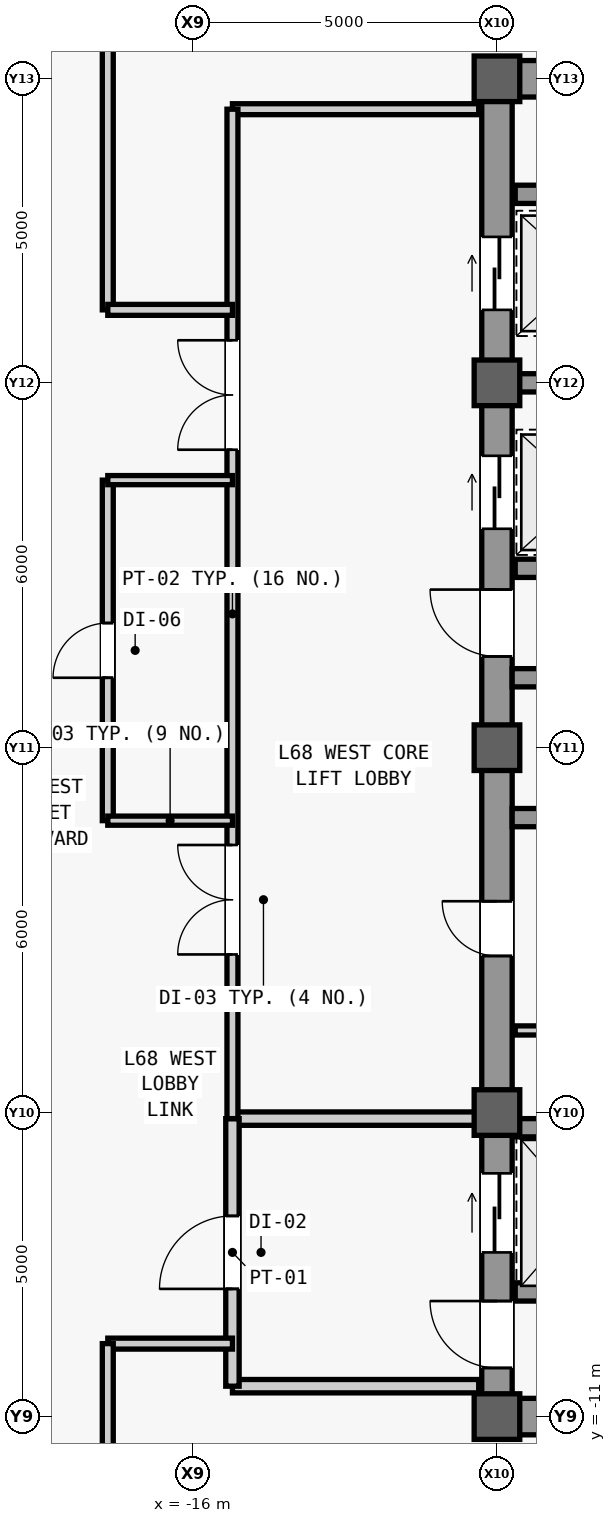
"""IFC4 building model, lengths in metres.
Left out: names, types, materials, properties, quantities, classifications, styles, units other than length and angle.
Written with IfcOpenShell. Run it as: python <this file> out.ifc"""

import sys

from ifc_helpers import new_model, si_unit, direction, frame, frame_2d, origin, origin_2d, place, context, subcontext, project, spatial, rectangle, extrude, source, transform, mapped, element, fill, save


model = new_model("IFC4")
c1 = context("Model", 3, precision=1e-05, world=origin(), true_north=direction((0.0, 1.0)))
c2 = subcontext(c1, "Body", "Model", "MODEL_VIEW")
j1 = project(units=[si_unit("LENGTHUNIT", "METRE"), si_unit("PLANEANGLEUNIT", "RADIAN")], contexts=[c1])
p1 = place(None, origin())
s1 = spatial("IfcSite", under=j1, at=p1, CompositionType="ELEMENT")
p2 = place(p1, origin())
s2 = spatial("IfcBuilding", under=s1, at=p2, CompositionType="ELEMENT")
p3 = place(p2, frame((0.0, 0.0, 289.5)))
s3 = spatial("IfcBuildingStorey", under=s2, at=p3, CompositionType="ELEMENT", Elevation=289.5)
m1 = source(origin(), c2, "Body", "SweptSolid", [
    extrude(rectangle(XDim=22.0, YDim=0.5, at=frame_2d((11.0, 0.0))), origin(), (0.0, 0.0, 1.0), 3.78),
])
p4 = place(p3, frame((-11.0, -11.0, 0.0), z_axis=(0.0, 0.0, 1.0), x_axis=(0.0, 1.0, 0.0)))
e1 = element("IfcWall", 1, at=p4, inside=s3, PredefinedType="SHEAR", context=c2, shape_type="MappedRepresentation", body=[
    mapped(m1, transform((0.0, 0.0, 0.0), scale=1.0)),
])
m2 = source(origin(), c2, "Body", "SweptSolid", [
    extrude(rectangle(XDim=1.1, YDim=2.2, at=frame_2d((0.55, 1.1))), frame((0.0, 0.26, 0.0), z_axis=(0.0, -1.0, 0.0), x_axis=(1.0, 0.0, 0.0)), (0.0, 0.0, 1.0), 0.52),
])
p5 = place(p4, frame((0.8, 0.0, 0.0)))
e2 = element("IfcOpeningElement", 2, at=p5, cuts=e1, PredefinedType="OPENING", context=c2, shape_type="MappedRepresentation", body=[
    mapped(m2, transform((0.0, 0.0, 0.0), scale=1.0)),
])
p6 = place(p4, frame((12.5, 0.0, 0.0)))
e3 = element("IfcOpeningElement", 3, at=p6, cuts=e1, PredefinedType="OPENING", context=c2, shape_type="MappedRepresentation", body=[
    mapped(m2, transform((0.0, 0.0, 0.0), scale=1.0)),
])
m3 = source(origin(), c2, "Body", "SweptSolid", [
    extrude(rectangle(XDim=0.9, YDim=2.15, at=frame_2d((0.45, 1.075))), frame((0.0, 0.26, 0.0), z_axis=(0.0, -1.0, 0.0), x_axis=(1.0, 0.0, 0.0)), (0.0, 0.0, 1.0), 0.52),
])
p7 = place(p4, frame((7.575, 0.0, 0.0)))
e4 = element("IfcOpeningElement", 4, at=p7, cuts=e1, PredefinedType="OPENING", context=c2, shape_type="MappedRepresentation", body=[
    mapped(m3, transform((0.0, 0.0, 0.0), scale=1.0)),
])
m4 = source(origin(), c2, "Body", "SweptSolid", [
    extrude(rectangle(XDim=1.2, YDim=2.3, at=frame_2d((0.6, 1.15))), frame((0.0, 0.26, 0.0), z_axis=(0.0, -1.0, 0.0), x_axis=(1.0, 0.0, 0.0)), (0.0, 0.0, 1.0), 0.52),
])
p8 = place(p4, frame((14.6, 0.0, 0.0)))
e5 = element("IfcOpeningElement", 5, at=p8, cuts=e1, PredefinedType="OPENING", context=c2, shape_type="MappedRepresentation", body=[
    mapped(m4, transform((0.0, 0.0, 0.0), scale=1.0)),
])
p9 = place(p4, frame((18.2, 0.0, 0.0)))
e6 = element("IfcOpeningElement", 6, at=p9, cuts=e1, PredefinedType="OPENING", context=c2, shape_type="MappedRepresentation", body=[
    mapped(m4, transform((0.0, 0.0, 0.0), scale=1.0)),
])
m5 = source(origin(), c2, "Body", "SweptSolid", [
    extrude(rectangle(XDim=1.3, YDim=2.3, at=frame_2d((0.65, 1.15))), frame((0.0, 0.26, 0.0), z_axis=(0.0, -1.0, 0.0), x_axis=(1.0, 0.0, 0.0)), (0.0, 0.0, 1.0), 0.52),
])
p10 = place(p4, frame((2.7, 0.0, 0.0)))
e7 = element("IfcOpeningElement", 7, at=p10, cuts=e1, PredefinedType="OPENING", context=c2, shape_type="MappedRepresentation", body=[
    mapped(m5, transform((0.0, 0.0, 0.0), scale=1.0)),
])
m6 = source(origin(), c2, "Body", "SweptSolid", [
    extrude(rectangle(XDim=5.9, YDim=0.6, at=frame_2d((2.95, 0.0))), origin(), (0.0, 0.0, 1.0), 3.78),
])
for number, where, z_axis, x_axis in (
    (8, (-10.75, -11.0, 0.0), (0.0, 0.0, 1.0), (1.0, 0.0, 0.0)),
    (9, (-10.75, 11.0, 0.0), (0.0, 0.0, 1.0), (1.0, 0.0, 0.0)),
):
    element("IfcWall", number, at=place(p3, frame(where, z_axis=z_axis, x_axis=x_axis)), inside=s3, PredefinedType="SHEAR", context=c2, shape_type="MappedRepresentation", body=[
        mapped(m6, transform((0.0, 0.0, 0.0), scale=1.0)),
    ])
m7 = source(origin(), c2, "Body", "SweptSolid", [
    extrude(rectangle(XDim=5.65, YDim=0.3, at=frame_2d((2.825, 0.0))), origin(), (0.0, 0.0, 1.0), 3.78),
])
for number, where, z_axis, x_axis in (
    (10, (-10.75, -1.15, 0.0), (0.0, 0.0, 1.0), (1.0, 0.0, 0.0)),
    (11, (-10.75, 1.15, 0.0), (0.0, 0.0, 1.0), (1.0, 0.0, 0.0)),
):
    element("IfcWall", number, at=place(p3, frame(where, z_axis=z_axis, x_axis=x_axis)), inside=s3, PredefinedType="SHEAR", context=c2, shape_type="MappedRepresentation", body=[
        mapped(m7, transform((0.0, 0.0, 0.0), scale=1.0)),
    ])
m8 = source(origin(), c2, "Body", "SweptSolid", [
    extrude(rectangle(XDim=0.75, YDim=0.75, at=origin_2d()), origin(), (0.0, 0.0, 1.0), 4.0),
])
for number, where, z_axis, x_axis in (
    (12, (-11.0, -11.0, 0.0), (0.0, 0.0, 1.0), (1.0, 0.0, 0.0)),
    (13, (-11.0, -6.0, 0.0), (0.0, 0.0, 1.0), (1.0, 0.0, 0.0)),
    (14, (-11.0, 0.0, 0.0), (0.0, 0.0, 1.0), (1.0, 0.0, 0.0)),
    (15, (-11.0, 6.0, 0.0), (0.0, 0.0, 1.0), (1.0, 0.0, 0.0)),
    (16, (-11.0, 11.0, 0.0), (0.0, 0.0, 1.0), (1.0, 0.0, 0.0)),
):
    element("IfcColumn", number, at=place(p3, frame(where, z_axis=z_axis, x_axis=x_axis)), inside=s3, PredefinedType="COLUMN", context=c2, shape_type="MappedRepresentation", body=[
        mapped(m8, transform((0.0, 0.0, 0.0), scale=1.0)),
    ])
m9 = source(origin(), c2, "Body", "SweptSolid", [
    extrude(rectangle(XDim=2.2, YDim=0.3, at=frame_2d((1.1, 0.0))), origin(), (0.0, 0.0, 1.0), 3.78),
])
for number, where, z_axis, x_axis in (
    (17, (-10.7, -8.95, 0.0), (0.0, 0.0, 1.0), (1.0, 0.0, 0.0)),
    (18, (-10.7, -6.25, 0.0), (0.0, 0.0, 1.0), (1.0, 0.0, 0.0)),
    (19, (-10.7, 2.95, 0.0), (0.0, 0.0, 1.0), (1.0, 0.0, 0.0)),
    (20, (-10.7, 6.0, 0.0), (0.0, 0.0, 1.0), (1.0, 0.0, 0.0)),
    (21, (-10.7, 9.1, 0.0), (0.0, 0.0, 1.0), (1.0, 0.0, 0.0)),
):
    element("IfcWall", number, at=place(p3, frame(where, z_axis=z_axis, x_axis=x_axis)), inside=s3, PredefinedType="SHEAR", context=c2, shape_type="MappedRepresentation", body=[
        mapped(m9, transform((0.0, 0.0, 0.0), scale=1.0)),
    ])
m10 = source(origin(), c2, "Body", "SweptSolid", [
    extrude(rectangle(XDim=2.05, YDim=0.15, at=frame_2d((1.025, 0.0))), origin(), (0.0, 0.0, 1.0), 3.78),
])
p11 = place(p3, frame((-10.7, -4.65, 0.0), z_axis=(0.0, 0.0, 1.0), x_axis=(1.0, 0.0, 0.0)))
e22 = element("IfcWall", 22, at=p11, inside=s3, PredefinedType="PARTITIONING", context=c2, shape_type="MappedRepresentation", body=[
    mapped(m10, transform((0.0, 0.0, 0.0), scale=1.0)),
])
m11 = source(origin(), c2, "Body", "SweptSolid", [
    extrude(rectangle(XDim=4.05, YDim=0.22, at=frame_2d((2.025, 0.0))), origin(), (0.0, 0.0, 1.0), 3.78),
])
p12 = place(p3, frame((-15.35, -10.5, 0.0), z_axis=(0.0, 0.0, 1.0), x_axis=(1.0, 0.0, 0.0)))
e23 = element("IfcWall", 23, at=p12, inside=s3, PredefinedType="PARTITIONING", context=c2, shape_type="MappedRepresentation", body=[
    mapped(m11, transform((0.0, 0.0, 0.0), scale=1.0)),
])
m12 = source(origin(), c2, "Body", "SweptSolid", [
    extrude(rectangle(XDim=4.05, YDim=0.22, at=frame_2d((2.025, 0.0))), origin(), (0.0, 0.0, 1.0), 3.085),
])
p13 = place(p3, frame((-15.35, -6.1, 0.0), z_axis=(0.0, 0.0, 1.0), x_axis=(1.0, 0.0, 0.0)))
e24 = element("IfcWall", 24, at=p13, inside=s3, PredefinedType="PARTITIONING", context=c2, shape_type="MappedRepresentation", body=[
    mapped(m12, transform((0.0, 0.0, 0.0), scale=1.0)),
])
m13 = source(origin(), c2, "Body", "SweptSolid", [
    extrude(rectangle(XDim=4.4, YDim=0.22, at=frame_2d((2.2, 0.0))), origin(), (0.0, 0.0, 1.0), 3.78),
])
p14 = place(p3, frame((-15.35, -10.5, 0.0), z_axis=(0.0, 0.0, 1.0), x_axis=(0.0, 1.0, 0.0)))
e25 = element("IfcWall", 25, at=p14, inside=s3, PredefinedType="PARTITIONING", context=c2, shape_type="MappedRepresentation", body=[
    mapped(m13, transform((0.0, 0.0, 0.0), scale=1.0)),
])
m14 = source(origin(), c2, "Body", "SweptSolid", [
    extrude(rectangle(XDim=1.2, YDim=2.2, at=frame_2d((0.6, 1.1))), frame((0.0, 0.12, 0.0), z_axis=(0.0, -1.0, 0.0), x_axis=(1.0, 0.0, 0.0)), (0.0, 0.0, 1.0), 0.24),
])
p15 = place(p14, frame((1.6, 0.0, 0.0)))
e26 = element("IfcOpeningElement", 26, at=p15, cuts=e25, PredefinedType="OPENING", context=c2, shape_type="MappedRepresentation", body=[
    mapped(m14, transform((0.0, 0.0, 0.0), scale=1.0)),
])
m15 = source(origin(), c2, "Body", "SweptSolid", [
    extrude(rectangle(XDim=4.05, YDim=0.18, at=frame_2d((2.025, 0.0))), origin(), (0.0, 0.0, 1.0), 3.78),
])
p16 = place(p3, frame((-15.35, 10.5, 0.0), z_axis=(0.0, 0.0, 1.0), x_axis=(1.0, 0.0, 0.0)))
e27 = element("IfcWall", 27, at=p16, inside=s3, PredefinedType="PARTITIONING", context=c2, shape_type="MappedRepresentation", body=[
    mapped(m15, transform((0.0, 0.0, 0.0), scale=1.0)),
])
m16 = source(origin(), c2, "Body", "SweptSolid", [
    extrude(rectangle(XDim=16.6, YDim=0.18, at=frame_2d((8.3, 0.0))), origin(), (0.0, 0.0, 1.0), 3.78),
])
p17 = place(p3, frame((-15.35, -6.1, 0.0), z_axis=(0.0, 0.0, 1.0), x_axis=(0.0, 1.0, 0.0)))
e28 = element("IfcWall", 28, at=p17, inside=s3, PredefinedType="PARTITIONING", context=c2, shape_type="MappedRepresentation", body=[
    mapped(m16, transform((0.0, 0.0, 0.0), scale=1.0)),
])
m17 = source(origin(), c2, "Body", "SweptSolid", [
    extrude(rectangle(XDim=1.8, YDim=2.25, at=frame_2d((0.9, 1.125))), frame((0.0, 0.1, 0.0), z_axis=(0.0, -1.0, 0.0), x_axis=(1.0, 0.0, 0.0)), (0.0, 0.0, 1.0), 0.2),
])
p18 = place(p17, frame((2.7, 0.0, 0.0)))
e29 = element("IfcOpeningElement", 29, at=p18, cuts=e28, PredefinedType="OPENING", context=c2, shape_type="MappedRepresentation", body=[
    mapped(m17, transform((0.0, 0.0, 0.0), scale=1.0)),
])
p19 = place(p17, frame((11.0, 0.0, 0.0)))
e30 = element("IfcOpeningElement", 30, at=p19, cuts=e28, PredefinedType="OPENING", context=c2, shape_type="MappedRepresentation", body=[
    mapped(m17, transform((0.0, 0.0, 0.0), scale=1.0)),
])
m18 = source(origin(), c2, "Body", "SweptSolid", [
    extrude(rectangle(XDim=5.6, YDim=0.18, at=frame_2d((2.8, 0.0))), origin(), (0.0, 0.0, 1.0), 3.78),
])
p20 = place(p3, frame((-17.4, -1.2, 0.0), z_axis=(0.0, 0.0, 1.0), x_axis=(0.0, 1.0, 0.0)))
e31 = element("IfcWall", 31, at=p20, inside=s3, PredefinedType="PARTITIONING", context=c2, shape_type="MappedRepresentation", body=[
    mapped(m18, transform((0.0, 0.0, 0.0), scale=1.0)),
])
m19 = source(origin(), c2, "Body", "SweptSolid", [
    extrude(rectangle(XDim=0.9, YDim=2.15, at=frame_2d((0.45, 1.075))), frame((0.0, 0.1, 0.0), z_axis=(0.0, -1.0, 0.0), x_axis=(1.0, 0.0, 0.0)), (0.0, 0.0, 1.0), 0.2),
])
p21 = place(p20, frame((2.35, 0.0, 0.0)))
e32 = element("IfcOpeningElement", 32, at=p21, cuts=e31, PredefinedType="OPENING", context=c2, shape_type="MappedRepresentation", body=[
    mapped(m19, transform((0.0, 0.0, 0.0), scale=1.0)),
])
m20 = source(origin(), c2, "Body", "SweptSolid", [
    extrude(rectangle(XDim=2.05, YDim=0.15, at=frame_2d((1.025, 0.0))), origin(), (0.0, 0.0, 1.0), 3.78),
])
for number, where, z_axis, x_axis in (
    (33, (-17.4, -1.2, 0.0), (0.0, 0.0, 1.0), (1.0, 0.0, 0.0)),
    (34, (-17.4, 4.4, 0.0), (0.0, 0.0, 1.0), (1.0, 0.0, 0.0)),
):
    element("IfcWall", number, at=place(p3, frame(where, z_axis=z_axis, x_axis=x_axis)), inside=s3, PredefinedType="PARTITIONING", context=c2, shape_type="MappedRepresentation", body=[
        mapped(m20, transform((0.0, 0.0, 0.0), scale=1.0)),
    ])
m21 = source(origin(), c2, "Body", "SweptSolid", [
    extrude(rectangle(XDim=2.05, YDim=0.18, at=frame_2d((1.025, 0.0))), origin(), (0.0, 0.0, 1.0), 3.78),
])
p22 = place(p3, frame((-17.4, -9.8, 0.0), z_axis=(0.0, 0.0, 1.0), x_axis=(1.0, 0.0, 0.0)))
e35 = element("IfcWall", 35, at=p22, inside=s3, PredefinedType="PARTITIONING", context=c2, shape_type="MappedRepresentation", body=[
    mapped(m21, transform((0.0, 0.0, 0.0), scale=1.0)),
])
m22 = source(origin(), c2, "Body", "SweptSolid", [
    extrude(rectangle(XDim=8.4, YDim=0.18, at=frame_2d((4.2, 0.0))), origin(), (0.0, 0.0, 1.0), 3.78),
])
p23 = place(p3, frame((-17.4, 7.2, 0.0), z_axis=(0.0, 0.0, 1.0), x_axis=(0.0, 1.0, 0.0)))
e36 = element("IfcWall", 36, at=p23, inside=s3, PredefinedType="PARTITIONING", context=c2, shape_type="MappedRepresentation", body=[
    mapped(m22, transform((0.0, 0.0, 0.0), scale=1.0)),
])
p24 = place(p3, frame((-17.4, 7.2, 0.0), z_axis=(0.0, 0.0, 1.0), x_axis=(1.0, 0.0, 0.0)))
e37 = element("IfcWall", 37, at=p24, inside=s3, PredefinedType="PARTITIONING", context=c2, shape_type="MappedRepresentation", body=[
    mapped(m21, transform((0.0, 0.0, 0.0), scale=1.0)),
])
m23 = source(origin(), c2, "Body", "SweptSolid", [
    extrude(rectangle(XDim=4.4, YDim=0.18, at=frame_2d((2.2, 0.0))), origin(), (0.0, 0.0, 1.0), 3.78),
])
p25 = place(p3, frame((-17.4, -14.2, 0.0), z_axis=(0.0, 0.0, 1.0), x_axis=(0.0, 1.0, 0.0)))
e38 = element("IfcWall", 38, at=p25, inside=s3, PredefinedType="PARTITIONING", context=c2, shape_type="MappedRepresentation", body=[
    mapped(m23, transform((0.0, 0.0, 0.0), scale=1.0)),
])
m24 = source(origin(), c2, "Body", "SweptSolid", [
    extrude(rectangle(XDim=1.1, YDim=2.2, at=frame_2d((0.55, 1.1))), frame((0.0, 0.025, 0.0), z_axis=(0.0, -1.0, 0.0), x_axis=(1.0, 0.0, 0.0)), (0.0, 0.0, 1.0), 0.05),
])
p26 = place(p5, origin())
e39 = element("IfcDoor", 39, at=p26, inside=s3, OperationType="SINGLE_SWING_RIGHT", PredefinedType="DOOR", context=c2, shape_type="MappedRepresentation", body=[
    mapped(m24, transform((0.0, 0.0, 0.0), scale=1.0)),
])
fill(e2, e39)
p27 = place(p6, origin())
e40 = element("IfcDoor", 40, at=p27, inside=s3, OperationType="SINGLE_SWING_RIGHT", PredefinedType="DOOR", context=c2, shape_type="MappedRepresentation", body=[
    mapped(m24, transform((0.0, 0.0, 0.0), scale=1.0)),
])
fill(e3, e40)
m25 = source(origin(), c2, "Body", "SweptSolid", [
    extrude(rectangle(XDim=0.9, YDim=2.15, at=frame_2d((0.45, 1.075))), frame((0.0, 0.025, 0.0), z_axis=(0.0, -1.0, 0.0), x_axis=(1.0, 0.0, 0.0)), (0.0, 0.0, 1.0), 0.05),
])
p28 = place(p7, origin())
e41 = element("IfcDoor", 41, at=p28, inside=s3, OperationType="SINGLE_SWING_RIGHT", PredefinedType="DOOR", context=c2, shape_type="MappedRepresentation", body=[
    mapped(m25, transform((0.0, 0.0, 0.0), scale=1.0)),
])
fill(e4, e41)
m26 = source(origin(), c2, "Body", "SweptSolid", [
    extrude(rectangle(XDim=1.2, YDim=2.2, at=frame_2d((0.6, 1.1))), frame((0.0, 0.025, 0.0), z_axis=(0.0, -1.0, 0.0), x_axis=(1.0, 0.0, 0.0)), (0.0, 0.0, 1.0), 0.05),
])
p29 = place(p15, origin())
e42 = element("IfcDoor", 42, at=p29, inside=s3, OperationType="SINGLE_SWING_LEFT", PredefinedType="DOOR", context=c2, shape_type="MappedRepresentation", body=[
    mapped(m26, transform((0.0, 0.0, 0.0), scale=1.0)),
])
fill(e26, e42)
m27 = source(origin(), c2, "Body", "SweptSolid", [
    extrude(rectangle(XDim=1.8, YDim=2.25, at=frame_2d((0.9, 1.125))), frame((0.0, 0.025, 0.0), z_axis=(0.0, -1.0, 0.0), x_axis=(1.0, 0.0, 0.0)), (0.0, 0.0, 1.0), 0.05),
])
p30 = place(p18, origin())
e43 = element("IfcDoor", 43, at=p30, inside=s3, OperationType="SINGLE_SWING_LEFT", PredefinedType="DOOR", context=c2, shape_type="MappedRepresentation", body=[
    mapped(m27, transform((0.0, 0.0, 0.0), scale=1.0)),
])
fill(e29, e43)
p31 = place(p19, origin())
e44 = element("IfcDoor", 44, at=p31, inside=s3, OperationType="SINGLE_SWING_RIGHT", PredefinedType="DOOR", context=c2, shape_type="MappedRepresentation", body=[
    mapped(m27, transform((0.0, 0.0, 0.0), scale=1.0)),
])
fill(e30, e44)
p32 = place(p21, origin())
e45 = element("IfcDoor", 45, at=p32, inside=s3, OperationType="SINGLE_SWING_LEFT", PredefinedType="DOOR", context=c2, shape_type="MappedRepresentation", body=[
    mapped(m25, transform((0.0, 0.0, 0.0), scale=1.0)),
])
fill(e32, e45)
m28 = source(origin(), c2, "Body", "SweptSolid", [
    extrude(rectangle(XDim=1.2, YDim=2.3, at=frame_2d((0.6, 1.15))), frame((0.0, 0.025, 0.0), z_axis=(0.0, -1.0, 0.0), x_axis=(1.0, 0.0, 0.0)), (0.0, 0.0, 1.0), 0.05),
])
p33 = place(p8, origin())
e46 = element("IfcDoor", 46, at=p33, inside=s3, OperationType="SLIDING_TO_LEFT", PredefinedType="DOOR", context=c2, shape_type="MappedRepresentation", body=[
    mapped(m28, transform((0.0, 0.0, 0.0), scale=1.0)),
])
fill(e5, e46)
p34 = place(p9, origin())
e47 = element("IfcDoor", 47, at=p34, inside=s3, OperationType="SLIDING_TO_LEFT", PredefinedType="DOOR", context=c2, shape_type="MappedRepresentation", body=[
    mapped(m28, transform((0.0, 0.0, 0.0), scale=1.0)),
])
fill(e6, e47)
m29 = source(origin(), c2, "Body", "SweptSolid", [
    extrude(rectangle(XDim=1.3, YDim=2.3, at=frame_2d((0.65, 1.15))), frame((0.0, 0.025, 0.0), z_axis=(0.0, -1.0, 0.0), x_axis=(1.0, 0.0, 0.0)), (0.0, 0.0, 1.0), 0.05),
])
p35 = place(p10, origin())
e48 = element("IfcDoor", 48, at=p35, inside=s3, OperationType="SLIDING_TO_LEFT", PredefinedType="DOOR", context=c2, shape_type="MappedRepresentation", body=[
    mapped(m29, transform((0.0, 0.0, 0.0), scale=1.0)),
])
fill(e7, e48)
save(model, sys.argv[1])
